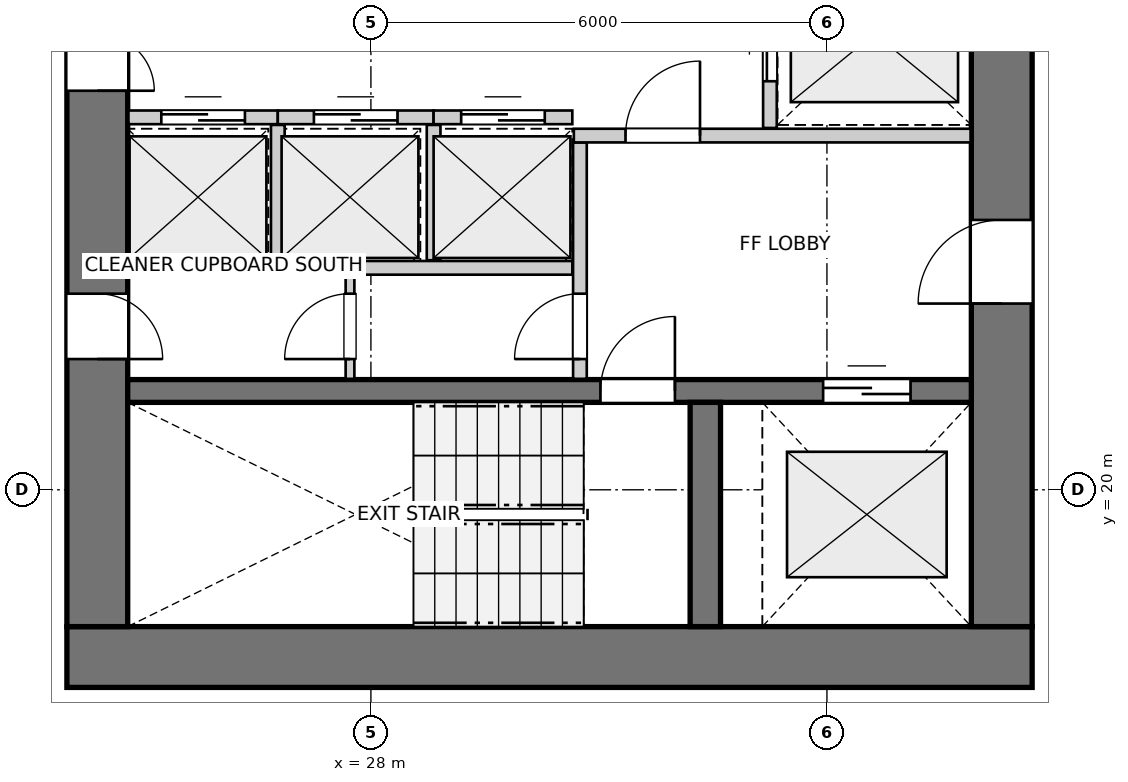
"""IFC4 building model, lengths in metres.
Left out: names, types, materials, properties, quantities, classifications, styles, units other than length and angle.
Written with IfcOpenShell. Run it as: python <this file> out.ifc"""

import sys

from ifc_helpers import new_model, si_unit, direction, frame, frame_2d, origin, place, context, subcontext, project, spatial, rectangle, extrude, source, transform, mapped, element, fill, save


model = new_model("IFC4")
c1 = context("Model", 3, precision=1e-05, world=origin(), true_north=direction((0.0, 1.0)))
c2 = subcontext(c1, "Body", "Model", "MODEL_VIEW")
j1 = project(units=[si_unit("LENGTHUNIT", "METRE"), si_unit("PLANEANGLEUNIT", "RADIAN")], contexts=[c1])
p1 = place(None, origin())
s1 = spatial("IfcSite", under=j1, at=p1, CompositionType="ELEMENT")
p2 = place(p1, origin())
s2 = spatial("IfcBuilding", under=s1, at=p2, CompositionType="ELEMENT")
p3 = place(p2, frame((0.0, 0.0, 46.2)))
s3 = spatial("IfcBuildingStorey", under=s2, at=p3, CompositionType="ELEMENT", Elevation=46.2)
p4 = place(p3, frame((24.0, 17.8, 0.0), z_axis=(0.0, 0.0, 1.0), x_axis=(1.0, 0.0, 0.0)))
e1 = element("IfcWall", 1, at=p4, inside=s3, PredefinedType="SHEAR", context=c2, shape_type="SweptSolid", body=[
    extrude(rectangle(XDim=12.7, YDim=0.8, at=frame_2d((6.35, 0.0))), origin(), (0.0, 0.0, 1.0), 2.94),
])
p5 = place(p3, frame((24.4, 33.8, 0.0), z_axis=(0.0, 0.0, 1.0), x_axis=(0.0, -1.0, 0.0)))
e2 = element("IfcWall", 2, at=p5, inside=s3, PredefinedType="SHEAR", context=c2, shape_type="SweptSolid", body=[
    extrude(rectangle(XDim=15.6, YDim=0.8, at=frame_2d((7.8, 0.0))), origin(), (0.0, 0.0, 1.0), 2.94),
])
p6 = place(p5, frame((7.05, 0.0, 0.0)))
e3 = element("IfcOpeningElement", 3, at=p6, cuts=e2, PredefinedType="OPENING", context=c2, shape_type="SweptSolid", body=[
    extrude(rectangle(XDim=1.5, YDim=2.15, at=frame_2d((0.75, 1.075))), frame((0.0, 0.41, 0.0), z_axis=(0.0, -1.0, 0.0), x_axis=(1.0, 0.0, 0.0)), (0.0, 0.0, 1.0), 0.82),
])
p7 = place(p5, frame((3.52, 0.0, 0.0)))
e4 = element("IfcOpeningElement", 4, at=p7, cuts=e2, PredefinedType="OPENING", context=c2, shape_type="SweptSolid", body=[
    extrude(rectangle(XDim=0.86, YDim=2.05, at=frame_2d((0.43, 1.025))), frame((0.0, 0.41, 0.0), z_axis=(0.0, -1.0, 0.0), x_axis=(1.0, 0.0, 0.0)), (0.0, 0.0, 1.0), 0.82),
])
p8 = place(p5, frame((11.22, 0.0, 0.0)))
e5 = element("IfcOpeningElement", 5, at=p8, cuts=e2, PredefinedType="OPENING", context=c2, shape_type="SweptSolid", body=[
    extrude(rectangle(XDim=0.86, YDim=2.05, at=frame_2d((0.43, 1.025))), frame((0.0, 0.41, 0.0), z_axis=(0.0, -1.0, 0.0), x_axis=(1.0, 0.0, 0.0)), (0.0, 0.0, 1.0), 0.82),
])
p9 = place(p3, frame((36.3, 18.2, 0.0), z_axis=(0.0, 0.0, 1.0), x_axis=(0.0, 1.0, 0.0)))
e6 = element("IfcWall", 6, at=p9, inside=s3, PredefinedType="SHEAR", context=c2, shape_type="SweptSolid", body=[
    extrude(rectangle(XDim=15.6, YDim=0.8, at=frame_2d((7.8, 0.0))), origin(), (0.0, 0.0, 1.0), 2.94),
])
p10 = place(p9, frame((4.25, 0.0, 0.0)))
e7 = element("IfcOpeningElement", 7, at=p10, cuts=e6, PredefinedType="OPENING", context=c2, shape_type="SweptSolid", body=[
    extrude(rectangle(XDim=1.1, YDim=2.15, at=frame_2d((0.55, 1.075))), frame((0.0, 0.41, 0.0), z_axis=(0.0, -1.0, 0.0), x_axis=(1.0, 0.0, 0.0)), (0.0, 0.0, 1.0), 0.82),
])
p11 = place(p9, frame((10.25, 0.0, 0.0)))
e8 = element("IfcOpeningElement", 8, at=p11, cuts=e6, PredefinedType="OPENING", context=c2, shape_type="SweptSolid", body=[
    extrude(rectangle(XDim=1.1, YDim=2.15, at=frame_2d((0.55, 1.075))), frame((0.0, 0.41, 0.0), z_axis=(0.0, -1.0, 0.0), x_axis=(1.0, 0.0, 0.0)), (0.0, 0.0, 1.0), 0.82),
])
p12 = place(p3, frame((24.8, 21.3, 0.0), z_axis=(0.0, 0.0, 1.0), x_axis=(1.0, 0.0, 0.0)))
e9 = element("IfcWall", 9, at=p12, inside=s3, PredefinedType="SHEAR", context=c2, shape_type="SweptSolid", body=[
    extrude(rectangle(XDim=11.1, YDim=0.3, at=frame_2d((5.55, 0.0))), origin(), (0.0, 0.0, 1.0), 2.94),
])
p13 = place(p12, frame((6.22, 0.0, 0.0)))
e10 = element("IfcOpeningElement", 10, at=p13, cuts=e9, PredefinedType="OPENING", context=c2, shape_type="SweptSolid", body=[
    extrude(rectangle(XDim=0.98, YDim=2.15, at=frame_2d((0.49, 1.075))), frame((0.0, 0.16, 0.0), z_axis=(0.0, -1.0, 0.0), x_axis=(1.0, 0.0, 0.0)), (0.0, 0.0, 1.0), 0.32),
])
p14 = place(p12, frame((9.15, 0.0, 0.0)))
e11 = element("IfcOpeningElement", 11, at=p14, cuts=e9, PredefinedType="OPENING", context=c2, shape_type="SweptSolid", body=[
    extrude(rectangle(XDim=1.15, YDim=2.15, at=frame_2d((0.575, 1.075))), frame((0.0, 0.16, 0.0), z_axis=(0.0, -1.0, 0.0), x_axis=(1.0, 0.0, 0.0)), (0.0, 0.0, 1.0), 0.32),
])
p15 = place(p3, frame((32.4, 18.2, 0.0), z_axis=(0.0, 0.0, 1.0), x_axis=(0.0, 1.0, 0.0)))
e12 = element("IfcWall", 12, at=p15, inside=s3, PredefinedType="SHEAR", context=c2, shape_type="SweptSolid", body=[
    extrude(rectangle(XDim=2.95, YDim=0.4, at=frame_2d((1.475, 0.0))), origin(), (0.0, 0.0, 1.0), 2.94),
])
p16 = place(p3, frame((30.75, 21.46, 0.0), z_axis=(0.0, 0.0, 1.0), x_axis=(0.0, 1.0, 0.0)))
e13 = element("IfcWall", 13, at=p16, inside=s3, PredefinedType="PARTITIONING", context=c2, shape_type="SweptSolid", body=[
    extrude(rectangle(XDim=3.11, YDim=0.18, at=frame_2d((1.555, 0.0))), origin(), (0.0, 0.0, 1.0), 2.94),
])
p17 = place(p16, frame((0.26, 0.0, 0.0)))
e14 = element("IfcOpeningElement", 14, at=p17, cuts=e13, PredefinedType="OPENING", context=c2, shape_type="SweptSolid", body=[
    extrude(rectangle(XDim=0.86, YDim=2.05, at=frame_2d((0.43, 1.025))), frame((0.0, 0.1, 0.0), z_axis=(0.0, -1.0, 0.0), x_axis=(1.0, 0.0, 0.0)), (0.0, 0.0, 1.0), 0.2),
])
p18 = place(p3, frame((30.67, 24.66, 0.0), z_axis=(0.0, 0.0, 1.0), x_axis=(1.0, 0.0, 0.0)))
e15 = element("IfcWall", 15, at=p18, inside=s3, PredefinedType="PARTITIONING", context=c2, shape_type="SweptSolid", body=[
    extrude(rectangle(XDim=5.22, YDim=0.18, at=frame_2d((2.61, 0.0))), origin(), (0.0, 0.0, 1.0), 2.94),
])
p19 = place(p18, frame((0.68, 0.0, 0.0)))
e16 = element("IfcOpeningElement", 16, at=p19, cuts=e15, PredefinedType="OPENING", context=c2, shape_type="SweptSolid", body=[
    extrude(rectangle(XDim=0.98, YDim=2.15, at=frame_2d((0.49, 1.075))), frame((0.0, 0.1, 0.0), z_axis=(0.0, -1.0, 0.0), x_axis=(1.0, 0.0, 0.0)), (0.0, 0.0, 1.0), 0.2),
])
p20 = place(p3, frame((33.25, 24.76, 0.0), z_axis=(0.0, 0.0, 1.0), x_axis=(0.0, 1.0, 0.0)))
e17 = element("IfcWall", 17, at=p20, inside=s3, PredefinedType="PARTITIONING", context=c2, shape_type="SweptSolid", body=[
    extrude(rectangle(XDim=2.48, YDim=0.18, at=frame_2d((1.24, 0.0))), origin(), (0.0, 0.0, 1.0), 2.94),
])
p21 = place(p20, frame((0.615, 0.0, 0.0)))
e18 = element("IfcOpeningElement", 18, at=p21, cuts=e17, PredefinedType="OPENING", context=c2, shape_type="SweptSolid", body=[
    extrude(rectangle(XDim=1.25, YDim=2.15, at=frame_2d((0.625, 1.075))), frame((0.0, 0.1, 0.0), z_axis=(0.0, -1.0, 0.0), x_axis=(1.0, 0.0, 0.0)), (0.0, 0.0, 1.0), 0.2),
])
p22 = place(p3, frame((24.81, 22.92, 0.0), z_axis=(0.0, 0.0, 1.0), x_axis=(1.0, 0.0, 0.0)))
e19 = element("IfcWall", 19, at=p22, inside=s3, PredefinedType="PARTITIONING", context=c2, shape_type="SweptSolid", body=[
    extrude(rectangle(XDim=5.84, YDim=0.18, at=frame_2d((2.92, 0.0))), origin(), (0.0, 0.0, 1.0), 2.94),
])
p23 = place(p3, frame((24.81, 24.9, 0.0), z_axis=(0.0, 0.0, 1.0), x_axis=(1.0, 0.0, 0.0)))
e20 = element("IfcWall", 20, at=p23, inside=s3, PredefinedType="PARTITIONING", context=c2, shape_type="SweptSolid", body=[
    extrude(rectangle(XDim=1.965, YDim=0.18, at=frame_2d((0.982, 0.0))), origin(), (0.0, 0.0, 1.0), 2.94),
])
p24 = place(p23, frame((0.433, 0.0, 0.0)))
e21 = element("IfcOpeningElement", 21, at=p24, cuts=e20, PredefinedType="OPENING", context=c2, shape_type="SweptSolid", body=[
    extrude(rectangle(XDim=1.1, YDim=2.15, at=frame_2d((0.55, 1.075))), frame((0.0, 0.1, 0.0), z_axis=(0.0, -1.0, 0.0), x_axis=(1.0, 0.0, 0.0)), (0.0, 0.0, 1.0), 0.2),
])
p25 = place(p3, frame((26.775, 24.9, 0.0), z_axis=(0.0, 0.0, 1.0), x_axis=(1.0, 0.0, 0.0)))
e22 = element("IfcWall", 22, at=p25, inside=s3, PredefinedType="PARTITIONING", context=c2, shape_type="SweptSolid", body=[
    extrude(rectangle(XDim=2.05, YDim=0.18, at=frame_2d((1.025, 0.0))), origin(), (0.0, 0.0, 1.0), 2.94),
])
p26 = place(p25, frame((0.475, 0.0, 0.0)))
e23 = element("IfcOpeningElement", 23, at=p26, cuts=e22, PredefinedType="OPENING", context=c2, shape_type="SweptSolid", body=[
    extrude(rectangle(XDim=1.1, YDim=2.15, at=frame_2d((0.55, 1.075))), frame((0.0, 0.1, 0.0), z_axis=(0.0, -1.0, 0.0), x_axis=(1.0, 0.0, 0.0)), (0.0, 0.0, 1.0), 0.2),
])
p27 = place(p3, frame((26.775, 23.02, 0.0), z_axis=(0.0, 0.0, 1.0), x_axis=(0.0, 1.0, 0.0)))
e24 = element("IfcWall", 24, at=p27, inside=s3, PredefinedType="PARTITIONING", context=c2, shape_type="SweptSolid", body=[
    extrude(rectangle(XDim=1.78, YDim=0.18, at=frame_2d((0.89, 0.0))), origin(), (0.0, 0.0, 1.0), 2.94),
])
p28 = place(p3, frame((28.825, 24.9, 0.0), z_axis=(0.0, 0.0, 1.0), x_axis=(1.0, 0.0, 0.0)))
e25 = element("IfcWall", 25, at=p28, inside=s3, PredefinedType="PARTITIONING", context=c2, shape_type="SweptSolid", body=[
    extrude(rectangle(XDim=1.825, YDim=0.18, at=frame_2d((0.913, 0.0))), origin(), (0.0, 0.0, 1.0), 2.94),
])
p29 = place(p28, frame((0.363, 0.0, 0.0)))
e26 = element("IfcOpeningElement", 26, at=p29, cuts=e25, PredefinedType="OPENING", context=c2, shape_type="SweptSolid", body=[
    extrude(rectangle(XDim=1.1, YDim=2.15, at=frame_2d((0.55, 1.075))), frame((0.0, 0.1, 0.0), z_axis=(0.0, -1.0, 0.0), x_axis=(1.0, 0.0, 0.0)), (0.0, 0.0, 1.0), 0.2),
])
p30 = place(p3, frame((28.825, 23.02, 0.0), z_axis=(0.0, 0.0, 1.0), x_axis=(0.0, 1.0, 0.0)))
e27 = element("IfcWall", 27, at=p30, inside=s3, PredefinedType="PARTITIONING", context=c2, shape_type="SweptSolid", body=[
    extrude(rectangle(XDim=1.78, YDim=0.18, at=frame_2d((0.89, 0.0))), origin(), (0.0, 0.0, 1.0), 2.94),
])
p31 = place(p3, frame((27.725, 21.46, 0.0), z_axis=(0.0, 0.0, 1.0), x_axis=(0.0, 1.0, 0.0)))
e28 = element("IfcWall", 28, at=p31, inside=s3, PredefinedType="PARTITIONING", context=c2, shape_type="SweptSolid", body=[
    extrude(rectangle(XDim=1.38, YDim=0.115, at=frame_2d((0.69, 0.0))), origin(), (0.0, 0.0, 1.0), 2.94),
])
p32 = place(p31, frame((0.26, 0.0, 0.0)))
e29 = element("IfcOpeningElement", 29, at=p32, cuts=e28, PredefinedType="OPENING", context=c2, shape_type="SweptSolid", body=[
    extrude(rectangle(XDim=0.86, YDim=2.05, at=frame_2d((0.43, 1.025))), frame((0.0, 0.067, 0.0), z_axis=(0.0, -1.0, 0.0), x_axis=(1.0, 0.0, 0.0)), (0.0, 0.0, 1.0), 0.135),
])
m1 = source(origin(), c2, "Body", "SweptSolid", [
    extrude(rectangle(XDim=0.98, YDim=2.15, at=frame_2d((0.49, 1.075))), frame((0.0, 0.025, 0.0), z_axis=(0.0, -1.0, 0.0), x_axis=(1.0, 0.0, 0.0)), (0.0, 0.0, 1.0), 0.05),
])
p33 = place(p13, origin())
e30 = element("IfcDoor", 30, at=p33, inside=s3, OperationType="SINGLE_SWING_RIGHT", PredefinedType="DOOR", context=c2, shape_type="MappedRepresentation", body=[
    mapped(m1, transform((0.0, 0.0, 0.0), x_axis=(1.0, 0.0, 0.0), y_axis=(0.0, 1.0, 0.0), z_axis=(0.0, 0.0, 1.0), scale=1.0)),
])
fill(e10, e30)
m2 = source(origin(), c2, "Body", "SweptSolid", [
    extrude(rectangle(XDim=1.15, YDim=2.15, at=frame_2d((0.575, 1.075))), frame((0.0, 0.025, 0.0), z_axis=(0.0, -1.0, 0.0), x_axis=(1.0, 0.0, 0.0)), (0.0, 0.0, 1.0), 0.05),
])
p34 = place(p14, origin())
e31 = element("IfcDoor", 31, at=p34, inside=s3, OperationType="DOUBLE_DOOR_SLIDING", PredefinedType="DOOR", context=c2, shape_type="MappedRepresentation", body=[
    mapped(m2, transform((0.0, 0.0, 0.0), x_axis=(1.0, 0.0, 0.0), y_axis=(0.0, 1.0, 0.0), z_axis=(0.0, 0.0, 1.0), scale=1.0)),
])
fill(e11, e31)
m3 = source(origin(), c2, "Body", "SweptSolid", [
    extrude(rectangle(XDim=1.1, YDim=2.15, at=frame_2d((0.55, 1.075))), frame((0.0, 0.025, 0.0), z_axis=(0.0, -1.0, 0.0), x_axis=(1.0, 0.0, 0.0)), (0.0, 0.0, 1.0), 0.05),
])
p35 = place(p10, origin())
e32 = element("IfcDoor", 32, at=p35, inside=s3, OperationType="SINGLE_SWING_LEFT", PredefinedType="DOOR", context=c2, shape_type="MappedRepresentation", body=[
    mapped(m3, transform((0.0, 0.0, 0.0), x_axis=(1.0, 0.0, 0.0), y_axis=(0.0, 1.0, 0.0), z_axis=(0.0, 0.0, 1.0), scale=1.0)),
])
fill(e7, e32)
m4 = source(origin(), c2, "Body", "SweptSolid", [
    extrude(rectangle(XDim=1.5, YDim=2.15, at=frame_2d((0.75, 1.075))), frame((0.0, 0.025, 0.0), z_axis=(0.0, -1.0, 0.0), x_axis=(1.0, 0.0, 0.0)), (0.0, 0.0, 1.0), 0.05),
])
p36 = place(p6, origin())
e33 = element("IfcDoor", 33, at=p36, inside=s3, OperationType="DOUBLE_DOOR_SINGLE_SWING", PredefinedType="DOOR", context=c2, shape_type="MappedRepresentation", body=[
    mapped(m4, transform((0.0, 0.0, 0.0), x_axis=(1.0, 0.0, 0.0), y_axis=(0.0, 1.0, 0.0), z_axis=(0.0, 0.0, 1.0), scale=1.0)),
])
fill(e3, e33)
m5 = source(origin(), c2, "Body", "SweptSolid", [
    extrude(rectangle(XDim=0.86, YDim=2.05, at=frame_2d((0.43, 1.025))), frame((0.0, 0.025, 0.0), z_axis=(0.0, -1.0, 0.0), x_axis=(1.0, 0.0, 0.0)), (0.0, 0.0, 1.0), 0.05),
])
p37 = place(p8, origin())
e34 = element("IfcDoor", 34, at=p37, inside=s3, OperationType="SINGLE_SWING_RIGHT", PredefinedType="DOOR", context=c2, shape_type="MappedRepresentation", body=[
    mapped(m5, transform((0.0, 0.0, 0.0), x_axis=(1.0, 0.0, 0.0), y_axis=(0.0, 1.0, 0.0), z_axis=(0.0, 0.0, 1.0), scale=1.0)),
])
fill(e5, e34)
p38 = place(p17, origin())
e35 = element("IfcDoor", 35, at=p38, inside=s3, OperationType="SINGLE_SWING_LEFT", PredefinedType="DOOR", context=c2, shape_type="MappedRepresentation", body=[
    mapped(m5, transform((0.0, 0.0, 0.0), x_axis=(1.0, 0.0, 0.0), y_axis=(0.0, 1.0, 0.0), z_axis=(0.0, 0.0, 1.0), scale=1.0)),
])
fill(e14, e35)
p39 = place(p19, origin())
e36 = element("IfcDoor", 36, at=p39, inside=s3, OperationType="SINGLE_SWING_RIGHT", PredefinedType="DOOR", context=c2, shape_type="MappedRepresentation", body=[
    mapped(m1, transform((0.0, 0.0, 0.0), x_axis=(1.0, 0.0, 0.0), y_axis=(0.0, 1.0, 0.0), z_axis=(0.0, 0.0, 1.0), scale=1.0)),
])
fill(e16, e36)
m6 = source(origin(), c2, "Body", "SweptSolid", [
    extrude(rectangle(XDim=1.25, YDim=2.15, at=frame_2d((0.625, 1.075))), frame((0.0, 0.025, 0.0), z_axis=(0.0, -1.0, 0.0), x_axis=(1.0, 0.0, 0.0)), (0.0, 0.0, 1.0), 0.05),
])
p40 = place(p21, origin())
e37 = element("IfcDoor", 37, at=p40, inside=s3, OperationType="DOUBLE_DOOR_SLIDING", PredefinedType="DOOR", context=c2, shape_type="MappedRepresentation", body=[
    mapped(m6, transform((0.0, 0.0, 0.0), x_axis=(1.0, 0.0, 0.0), y_axis=(0.0, 1.0, 0.0), z_axis=(0.0, 0.0, 1.0), scale=1.0)),
])
fill(e18, e37)
p41 = place(p24, origin())
e38 = element("IfcDoor", 38, at=p41, inside=s3, OperationType="DOUBLE_DOOR_SLIDING", PredefinedType="DOOR", context=c2, shape_type="MappedRepresentation", body=[
    mapped(m3, transform((0.0, 0.0, 0.0), x_axis=(1.0, 0.0, 0.0), y_axis=(0.0, 1.0, 0.0), z_axis=(0.0, 0.0, 1.0), scale=1.0)),
])
fill(e21, e38)
p42 = place(p26, origin())
e39 = element("IfcDoor", 39, at=p42, inside=s3, OperationType="DOUBLE_DOOR_SLIDING", PredefinedType="DOOR", context=c2, shape_type="MappedRepresentation", body=[
    mapped(m3, transform((0.0, 0.0, 0.0), x_axis=(1.0, 0.0, 0.0), y_axis=(0.0, 1.0, 0.0), z_axis=(0.0, 0.0, 1.0), scale=1.0)),
])
fill(e23, e39)
p43 = place(p29, origin())
e40 = element("IfcDoor", 40, at=p43, inside=s3, OperationType="DOUBLE_DOOR_SLIDING", PredefinedType="DOOR", context=c2, shape_type="MappedRepresentation", body=[
    mapped(m3, transform((0.0, 0.0, 0.0), x_axis=(1.0, 0.0, 0.0), y_axis=(0.0, 1.0, 0.0), z_axis=(0.0, 0.0, 1.0), scale=1.0)),
])
fill(e26, e40)
p44 = place(p32, origin())
e41 = element("IfcDoor", 41, at=p44, inside=s3, OperationType="SINGLE_SWING_LEFT", PredefinedType="DOOR", context=c2, shape_type="MappedRepresentation", body=[
    mapped(m5, transform((0.0, 0.0, 0.0), x_axis=(1.0, 0.0, 0.0), y_axis=(0.0, 1.0, 0.0), z_axis=(0.0, 0.0, 1.0), scale=1.0)),
])
fill(e29, e41)
save(model, sys.argv[1])
